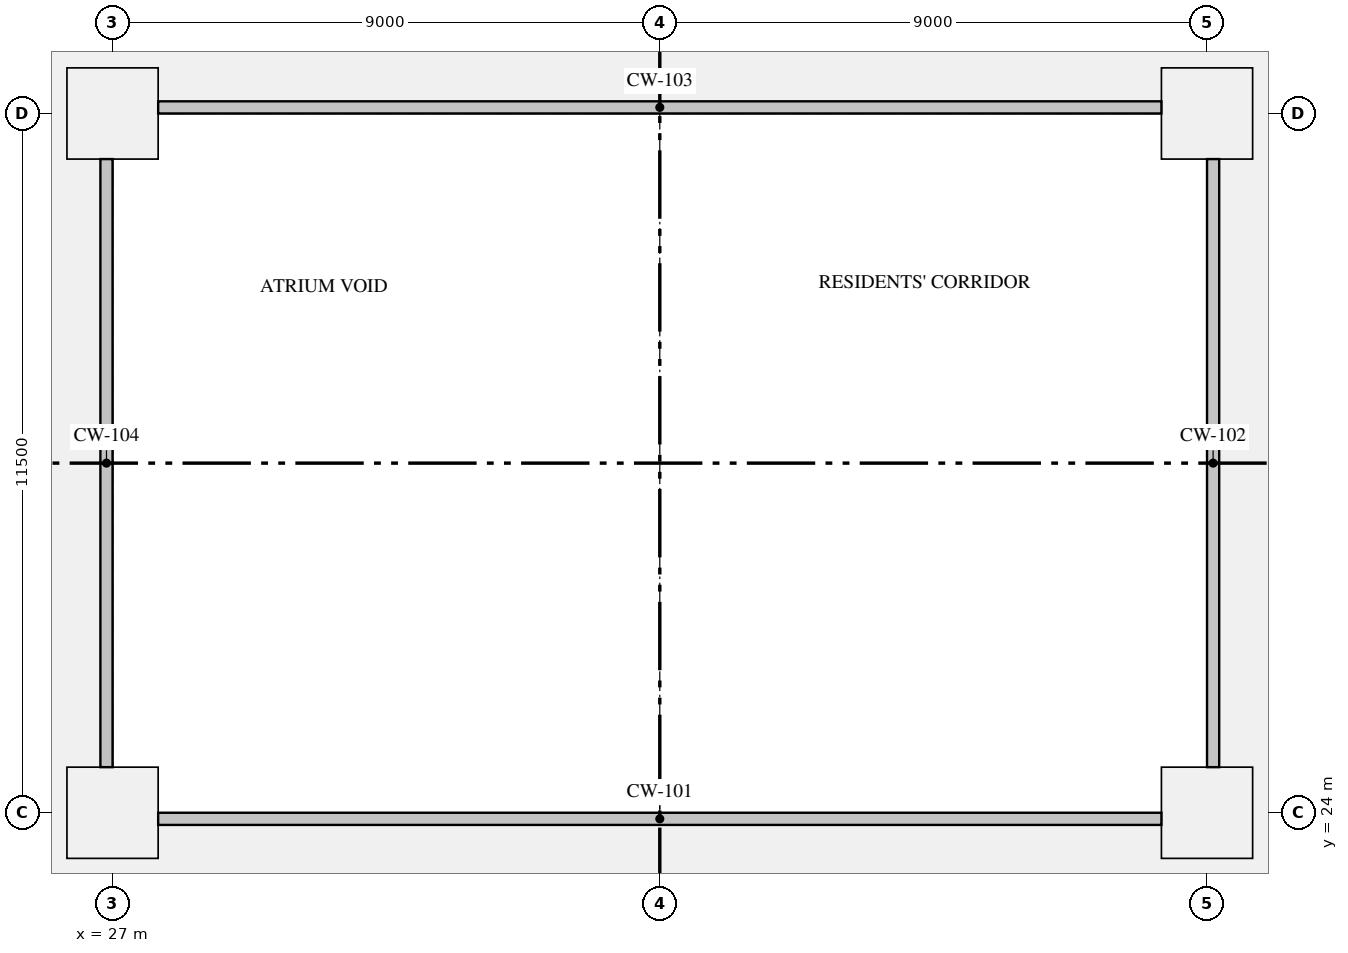
"""IFC4 building model, lengths in metres.
Left out: names, types, materials, properties, quantities, classifications, styles, units other than length and angle.
Written with IfcOpenShell. Run it as: python <this file> out.ifc"""

import sys

from ifc_helpers import new_model, si_unit, direction, frame, origin, origin_2d, place, context, subcontext, project, spatial, rectangle, extrude, element, save


model = new_model("IFC4")
c1 = context("Model", 3, precision=1e-05, world=origin(), true_north=direction((0.0, 1.0)))
c2 = subcontext(c1, "Body", "Model", "MODEL_VIEW")
j1 = project(units=[si_unit("LENGTHUNIT", "METRE"), si_unit("PLANEANGLEUNIT", "RADIAN")], contexts=[c1])
p1 = place(None, origin())
s1 = spatial("IfcSite", under=j1, at=p1, CompositionType="ELEMENT")
p2 = place(p1, origin())
s2 = spatial("IfcBuilding", under=s1, at=p2, CompositionType="ELEMENT")
p3 = place(p2, frame((0.0, 0.0, 69.9)))
s3 = spatial("IfcBuildingStorey", under=s2, at=p3, CompositionType="ELEMENT", Elevation=69.9)
for number, where, z_axis, x_axis in (
    (1, (27.0, 24.0, 0.0), (0.0, 0.0, 1.0), (1.0, 0.0, 0.0)),
    (2, (45.0, 24.0, 0.0), (0.0, 0.0, 1.0), (1.0, 0.0, 0.0)),
    (3, (27.0, 35.5, 0.0), (0.0, 0.0, 1.0), (1.0, 0.0, 0.0)),
    (4, (45.0, 35.5, 0.0), (0.0, 0.0, 1.0), (1.0, 0.0, 0.0)),
):
    element("IfcColumn", number, at=place(p3, frame(where, z_axis=z_axis, x_axis=x_axis)), inside=s3, PredefinedType="COLUMN", context=c2, shape_type="SweptSolid", body=[
        extrude(rectangle(XDim=1.5, YDim=1.5, at=origin_2d()), origin(), (0.0, 0.0, 1.0), 3.15),
    ])
save(model, sys.argv[1])
